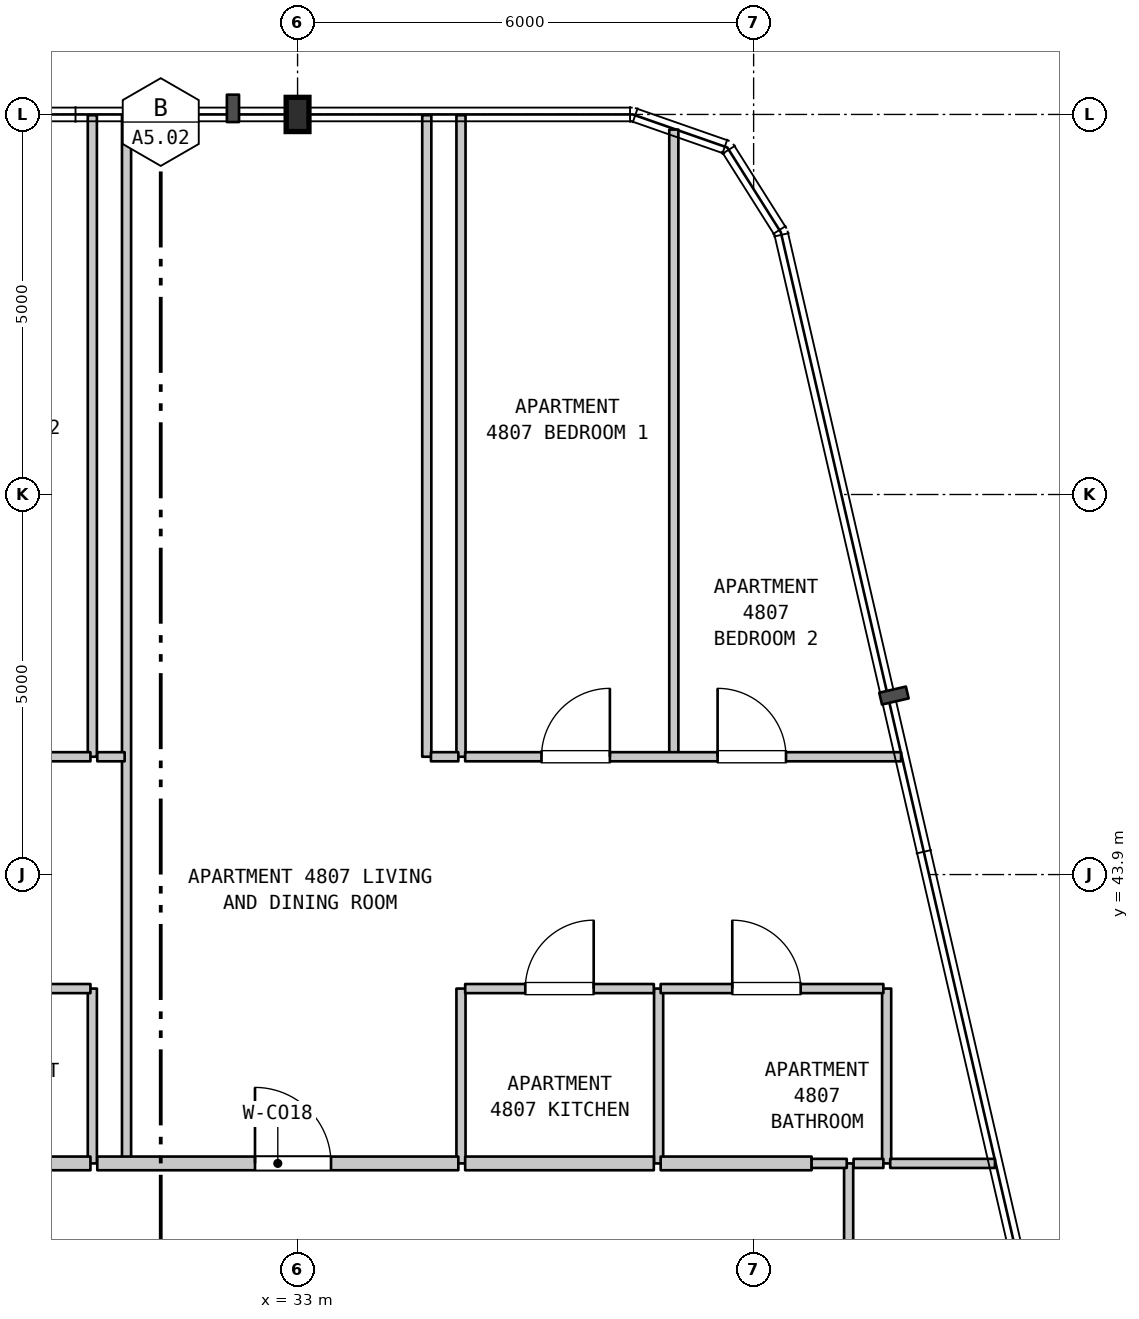
"""IFC4 building model, lengths in metres.
Left out: names, types, materials, properties, quantities, classifications, styles, units other than length and angle.
Written with IfcOpenShell. Run it as: python <this file> out.ifc"""

import sys

from ifc_helpers import new_model, si_unit, direction, frame, frame_2d, origin, origin_2d, place, context, subcontext, project, spatial, rectangle, i_section, extrude, element, fill, save


model = new_model("IFC4")
c1 = context("Model", 3, precision=1e-05, world=origin(), true_north=direction((0.0, 1.0)))
c2 = subcontext(c1, "Body", "Model", "MODEL_VIEW")
j1 = project(units=[si_unit("LENGTHUNIT", "METRE"), si_unit("PLANEANGLEUNIT", "RADIAN")], contexts=[c1])
p1 = place(None, origin())
s1 = spatial("IfcSite", under=j1, at=p1, CompositionType="ELEMENT")
p2 = place(p1, origin())
s2 = spatial("IfcBuilding", under=s1, at=p2, CompositionType="ELEMENT")
p3 = place(p2, frame((0.0, 0.0, 195.8)))
s3 = spatial("IfcBuildingStorey", under=s2, at=p3, CompositionType="ELEMENT", Elevation=195.8)
p4 = place(p3, frame((33.0, 53.9, 0.0), z_axis=(0.0, 0.0, 1.0), x_axis=(1.0, 0.0, 0.0)))
e1 = element("IfcColumn", 1, at=p4, inside=s3, PredefinedType="COLUMN", context=c2, shape_type="SweptSolid", body=[
    extrude(i_section(OverallWidth=0.3, OverallDepth=0.45, WebThickness=0.014, FlangeThickness=0.026, FilletRadius=0.027, at=origin_2d()), origin(), (0.0, 0.0, 1.0), 3.7),
])
p5 = place(p3, frame((30.3, 40.1, 0.0), z_axis=(0.0, 0.0, 1.0), x_axis=(0.0, 1.0, 0.0)))
e2 = element("IfcWall", 2, at=p5, inside=s3, PredefinedType="PARTITIONING", context=c2, shape_type="SweptSolid", body=[
    extrude(rectangle(XDim=2.3, YDim=0.12, at=frame_2d((1.15, 0.0))), origin(), (0.0, 0.0, 1.0), 3.39),
])
p6 = place(p3, frame((30.3, 45.45, 0.0), z_axis=(0.0, 0.0, 1.0), x_axis=(0.0, 1.0, 0.0)))
e3 = element("IfcWall", 3, at=p6, inside=s3, PredefinedType="PARTITIONING", context=c2, shape_type="SweptSolid", body=[
    extrude(rectangle(XDim=8.44, YDim=0.12, at=frame_2d((4.22, 0.0))), origin(), (0.0, 0.0, 1.0), 3.39),
])
p7 = place(p3, frame((30.75, 40.1, 0.0), z_axis=(0.0, 0.0, 1.0), x_axis=(0.0, 1.0, 0.0)))
e4 = element("IfcWall", 4, at=p7, inside=s3, PredefinedType="PARTITIONING", context=c2, shape_type="SweptSolid", body=[
    extrude(rectangle(XDim=13.79, YDim=0.12, at=frame_2d((6.895, 0.0))), origin(), (0.0, 0.0, 1.0), 3.39),
])
p8 = place(p3, frame((34.7, 45.45, 0.0), z_axis=(0.0, 0.0, 1.0), x_axis=(0.0, 1.0, 0.0)))
e5 = element("IfcWall", 5, at=p8, inside=s3, PredefinedType="PARTITIONING", context=c2, shape_type="SweptSolid", body=[
    extrude(rectangle(XDim=8.44, YDim=0.12, at=frame_2d((4.22, 0.0))), origin(), (0.0, 0.0, 1.0), 3.39),
])
p9 = place(p3, frame((35.15, 40.1, 0.0), z_axis=(0.0, 0.0, 1.0), x_axis=(0.0, 1.0, 0.0)))
e6 = element("IfcWall", 6, at=p9, inside=s3, PredefinedType="PARTITIONING", context=c2, shape_type="SweptSolid", body=[
    extrude(rectangle(XDim=2.3, YDim=0.12, at=frame_2d((1.15, 0.0))), origin(), (0.0, 0.0, 1.0), 3.39),
])
p10 = place(p3, frame((35.15, 45.45, 0.0), z_axis=(0.0, 0.0, 1.0), x_axis=(0.0, 1.0, 0.0)))
e7 = element("IfcWall", 7, at=p10, inside=s3, PredefinedType="PARTITIONING", context=c2, shape_type="SweptSolid", body=[
    extrude(rectangle(XDim=8.44, YDim=0.12, at=frame_2d((4.22, 0.0))), origin(), (0.0, 0.0, 1.0), 3.39),
])
p11 = place(p3, frame((37.75, 40.1, 0.0), z_axis=(0.0, 0.0, 1.0), x_axis=(0.0, 1.0, 0.0)))
e8 = element("IfcWall", 8, at=p11, inside=s3, PredefinedType="PARTITIONING", context=c2, shape_type="SweptSolid", body=[
    extrude(rectangle(XDim=2.3, YDim=0.12, at=frame_2d((1.15, 0.0))), origin(), (0.0, 0.0, 1.0), 3.39),
])
p12 = place(p3, frame((37.95, 45.45, 0.0), z_axis=(0.0, 0.0, 1.0), x_axis=(0.0, 1.0, 0.0)))
e9 = element("IfcWall", 9, at=p12, inside=s3, PredefinedType="PARTITIONING", context=c2, shape_type="SweptSolid", body=[
    extrude(rectangle(XDim=8.251, YDim=0.12, at=frame_2d((4.125, 0.0))), origin(), (0.0, 0.0, 1.0), 3.39),
])
p13 = place(p3, frame((40.25, 37.9, 0.0), z_axis=(0.0, 0.0, 1.0), x_axis=(0.0, 1.0, 0.0)))
e10 = element("IfcWall", 10, at=p13, inside=s3, PredefinedType="PARTITIONING", context=c2, shape_type="SweptSolid", body=[
    extrude(rectangle(XDim=2.2, YDim=0.12, at=frame_2d((1.1, 0.0))), origin(), (0.0, 0.0, 1.0), 3.39),
])
p14 = place(p3, frame((40.75, 40.1, 0.0), z_axis=(0.0, 0.0, 1.0), x_axis=(0.0, 1.0, 0.0)))
e11 = element("IfcWall", 11, at=p14, inside=s3, PredefinedType="PARTITIONING", context=c2, shape_type="SweptSolid", body=[
    extrude(rectangle(XDim=2.3, YDim=0.12, at=frame_2d((1.15, 0.0))), origin(), (0.0, 0.0, 1.0), 3.39),
])
p15 = place(p3, frame((27.125, 40.1, 0.0), z_axis=(0.0, 0.0, 1.0), x_axis=(1.0, 0.0, 0.0)))
e12 = element("IfcWall", 12, at=p15, inside=s3, PredefinedType="STANDARD", context=c2, shape_type="SweptSolid", body=[
    extrude(rectangle(XDim=3.15, YDim=0.18, at=frame_2d((1.575, 0.0))), origin(), (0.0, 0.0, 1.0), 3.39),
])
p16 = place(p3, frame((30.365, 40.1, 0.0), z_axis=(0.0, 0.0, 1.0), x_axis=(1.0, 0.0, 0.0)))
e13 = element("IfcWall", 13, at=p16, inside=s3, PredefinedType="STANDARD", context=c2, shape_type="SweptSolid", body=[
    extrude(rectangle(XDim=4.75, YDim=0.18, at=frame_2d((2.375, 0.0))), origin(), (0.0, 0.0, 1.0), 3.39),
])
p17 = place(p16, frame((2.075, 0.0, 0.0)))
e14 = element("IfcOpeningElement", 14, at=p17, cuts=e13, PredefinedType="OPENING", context=c2, shape_type="SweptSolid", body=[
    extrude(rectangle(XDim=1.0, YDim=2.15, at=frame_2d((0.5, 1.075))), frame((0.0, 0.1, 0.0), z_axis=(0.0, -1.0, 0.0), x_axis=(1.0, 0.0, 0.0)), (0.0, 0.0, 1.0), 0.2),
])
p18 = place(p3, frame((35.205, 40.1, 0.0), z_axis=(0.0, 0.0, 1.0), x_axis=(1.0, 0.0, 0.0)))
e15 = element("IfcWall", 15, at=p18, inside=s3, PredefinedType="STANDARD", context=c2, shape_type="SweptSolid", body=[
    extrude(rectangle(XDim=2.482, YDim=0.18, at=frame_2d((1.241, 0.0))), origin(), (0.0, 0.0, 1.0), 3.39),
])
p19 = place(p3, frame((37.777, 40.1, 0.0), z_axis=(0.0, 0.0, 1.0), x_axis=(1.0, 0.0, 0.0)))
e16 = element("IfcWall", 16, at=p19, inside=s3, PredefinedType="STANDARD", context=c2, shape_type="SweptSolid", body=[
    extrude(rectangle(XDim=1.986, YDim=0.18, at=frame_2d((0.993, 0.0))), origin(), (0.0, 0.0, 1.0), 3.39),
])
p20 = place(p3, frame((39.763, 40.1, 0.0), z_axis=(0.0, 0.0, 1.0), x_axis=(1.0, 0.0, 0.0)))
e17 = element("IfcWall", 17, at=p20, inside=s3, PredefinedType="PARTITIONING", context=c2, shape_type="SweptSolid", body=[
    extrude(rectangle(XDim=0.462, YDim=0.12, at=frame_2d((0.231, 0.0))), origin(), (0.0, 0.0, 1.0), 3.39),
])
p21 = place(p3, frame((40.315, 40.1, 0.0), z_axis=(0.0, 0.0, 1.0), x_axis=(1.0, 0.0, 0.0)))
e18 = element("IfcWall", 18, at=p21, inside=s3, PredefinedType="PARTITIONING", context=c2, shape_type="SweptSolid", body=[
    extrude(rectangle(XDim=0.392, YDim=0.12, at=frame_2d((0.196, 0.0))), origin(), (0.0, 0.0, 1.0), 3.39),
])
p22 = place(p3, frame((40.797, 40.1, 0.0), z_axis=(0.0, 0.0, 1.0), x_axis=(1.0, 0.0, 0.0)))
e19 = element("IfcWall", 19, at=p22, inside=s3, PredefinedType="PARTITIONING", context=c2, shape_type="SweptSolid", body=[
    extrude(rectangle(XDim=1.378, YDim=0.12, at=frame_2d((0.689, 0.0))), origin(), (0.0, 0.0, 1.0), 3.39),
])
p23 = place(p3, frame((27.125, 42.4, 0.0), z_axis=(0.0, 0.0, 1.0), x_axis=(1.0, 0.0, 0.0)))
e20 = element("IfcWall", 20, at=p23, inside=s3, PredefinedType="PARTITIONING", context=c2, shape_type="SweptSolid", body=[
    extrude(rectangle(XDim=3.15, YDim=0.12, at=frame_2d((1.575, 0.0))), origin(), (0.0, 0.0, 1.0), 3.39),
])
p24 = place(p23, frame((1.054, 0.0, 0.0)))
e21 = element("IfcOpeningElement", 21, at=p24, cuts=e20, PredefinedType="OPENING", context=c2, shape_type="SweptSolid", body=[
    extrude(rectangle(XDim=0.9, YDim=2.1, at=frame_2d((0.45, 1.05))), frame((0.0, 0.07, 0.0), z_axis=(0.0, -1.0, 0.0), x_axis=(1.0, 0.0, 0.0)), (0.0, 0.0, 1.0), 0.14),
])
p25 = place(p3, frame((35.205, 42.4, 0.0), z_axis=(0.0, 0.0, 1.0), x_axis=(1.0, 0.0, 0.0)))
e22 = element("IfcWall", 22, at=p25, inside=s3, PredefinedType="PARTITIONING", context=c2, shape_type="SweptSolid", body=[
    extrude(rectangle(XDim=2.482, YDim=0.12, at=frame_2d((1.241, 0.0))), origin(), (0.0, 0.0, 1.0), 3.39),
])
p26 = place(p25, frame((0.791, 0.0, 0.0)))
e23 = element("IfcOpeningElement", 23, at=p26, cuts=e22, PredefinedType="OPENING", context=c2, shape_type="SweptSolid", body=[
    extrude(rectangle(XDim=0.9, YDim=2.15, at=frame_2d((0.45, 1.075))), frame((0.0, 0.07, 0.0), z_axis=(0.0, -1.0, 0.0), x_axis=(1.0, 0.0, 0.0)), (0.0, 0.0, 1.0), 0.14),
])
p27 = place(p3, frame((37.777, 42.4, 0.0), z_axis=(0.0, 0.0, 1.0), x_axis=(1.0, 0.0, 0.0)))
e24 = element("IfcWall", 24, at=p27, inside=s3, PredefinedType="PARTITIONING", context=c2, shape_type="SweptSolid", body=[
    extrude(rectangle(XDim=2.93, YDim=0.12, at=frame_2d((1.465, 0.0))), origin(), (0.0, 0.0, 1.0), 3.39),
])
p28 = place(p27, frame((0.942, 0.0, 0.0)))
e25 = element("IfcOpeningElement", 25, at=p28, cuts=e24, PredefinedType="OPENING", context=c2, shape_type="SweptSolid", body=[
    extrude(rectangle(XDim=0.9, YDim=2.1, at=frame_2d((0.45, 1.05))), frame((0.0, 0.07, 0.0), z_axis=(0.0, -1.0, 0.0), x_axis=(1.0, 0.0, 0.0)), (0.0, 0.0, 1.0), 0.14),
])
p29 = place(p3, frame((24.365, 45.45, 0.0), z_axis=(0.0, 0.0, 1.0), x_axis=(1.0, 0.0, 0.0)))
e26 = element("IfcWall", 26, at=p29, inside=s3, PredefinedType="PARTITIONING", context=c2, shape_type="SweptSolid", body=[
    extrude(rectangle(XDim=5.91, YDim=0.12, at=frame_2d((2.955, 0.0))), origin(), (0.0, 0.0, 1.0), 3.39),
])
p30 = place(p29, frame((1.11, 0.0, 0.0)))
e27 = element("IfcOpeningElement", 27, at=p30, cuts=e26, PredefinedType="OPENING", context=c2, shape_type="SweptSolid", body=[
    extrude(rectangle(XDim=0.9, YDim=2.15, at=frame_2d((0.45, 1.075))), frame((0.0, 0.07, 0.0), z_axis=(0.0, -1.0, 0.0), x_axis=(1.0, 0.0, 0.0)), (0.0, 0.0, 1.0), 0.14),
])
p31 = place(p29, frame((3.76, 0.0, 0.0)))
e28 = element("IfcOpeningElement", 28, at=p31, cuts=e26, PredefinedType="OPENING", context=c2, shape_type="SweptSolid", body=[
    extrude(rectangle(XDim=0.9, YDim=2.15, at=frame_2d((0.45, 1.075))), frame((0.0, 0.07, 0.0), z_axis=(0.0, -1.0, 0.0), x_axis=(1.0, 0.0, 0.0)), (0.0, 0.0, 1.0), 0.14),
])
for number, where, z_axis, x_axis in (
    (29, (30.365, 45.45, 0.0), (0.0, 0.0, 1.0), (1.0, 0.0, 0.0)),
    (30, (34.755, 45.45, 0.0), (0.0, 0.0, 1.0), (1.0, 0.0, 0.0)),
):
    element("IfcWall", number, at=place(p3, frame(where, z_axis=z_axis, x_axis=x_axis)), inside=s3, PredefinedType="PARTITIONING", context=c2, shape_type="SweptSolid", body=[
        extrude(rectangle(XDim=0.36, YDim=0.12, at=frame_2d((0.18, 0.0))), origin(), (0.0, 0.0, 1.0), 3.39),
    ])
p32 = place(p3, frame((35.205, 45.45, 0.0), z_axis=(0.0, 0.0, 1.0), x_axis=(1.0, 0.0, 0.0)))
e31 = element("IfcWall", 31, at=p32, inside=s3, PredefinedType="PARTITIONING", context=c2, shape_type="SweptSolid", body=[
    extrude(rectangle(XDim=5.735, YDim=0.12, at=frame_2d((2.867, 0.0))), origin(), (0.0, 0.0, 1.0), 3.39),
])
p33 = place(p32, frame((1.004, 0.0, 0.0)))
e32 = element("IfcOpeningElement", 32, at=p33, cuts=e31, PredefinedType="OPENING", context=c2, shape_type="SweptSolid", body=[
    extrude(rectangle(XDim=0.9, YDim=2.15, at=frame_2d((0.45, 1.075))), frame((0.0, 0.07, 0.0), z_axis=(0.0, -1.0, 0.0), x_axis=(1.0, 0.0, 0.0)), (0.0, 0.0, 1.0), 0.14),
])
p34 = place(p32, frame((3.321, 0.0, 0.0)))
e33 = element("IfcOpeningElement", 33, at=p34, cuts=e31, PredefinedType="OPENING", context=c2, shape_type="SweptSolid", body=[
    extrude(rectangle(XDim=0.9, YDim=2.15, at=frame_2d((0.45, 1.075))), frame((0.0, 0.07, 0.0), z_axis=(0.0, -1.0, 0.0), x_axis=(1.0, 0.0, 0.0)), (0.0, 0.0, 1.0), 0.14),
])
p35 = place(p17, origin())
e34 = element("IfcDoor", 34, at=p35, inside=s3, OperationType="SINGLE_SWING_LEFT", PredefinedType="DOOR", context=c2, shape_type="SweptSolid", body=[
    extrude(rectangle(XDim=1.0, YDim=2.15, at=frame_2d((0.5, 1.075))), frame((0.0, 0.025, 0.0), z_axis=(0.0, -1.0, 0.0), x_axis=(1.0, 0.0, 0.0)), (0.0, 0.0, 1.0), 0.05),
])
fill(e14, e34)
p36 = place(p26, origin())
e35 = element("IfcDoor", 35, at=p36, inside=s3, OperationType="SINGLE_SWING_RIGHT", PredefinedType="DOOR", context=c2, shape_type="SweptSolid", body=[
    extrude(rectangle(XDim=0.9, YDim=2.15, at=frame_2d((0.45, 1.075))), frame((0.0, 0.025, 0.0), z_axis=(0.0, -1.0, 0.0), x_axis=(1.0, 0.0, 0.0)), (0.0, 0.0, 1.0), 0.05),
])
fill(e23, e35)
p37 = place(p28, origin())
e36 = element("IfcDoor", 36, at=p37, inside=s3, OperationType="SINGLE_SWING_LEFT", PredefinedType="DOOR", context=c2, shape_type="SweptSolid", body=[
    extrude(rectangle(XDim=0.9, YDim=2.1, at=frame_2d((0.45, 1.05))), frame((0.0, 0.025, 0.0), z_axis=(0.0, -1.0, 0.0), x_axis=(1.0, 0.0, 0.0)), (0.0, 0.0, 1.0), 0.05),
])
fill(e25, e36)
p38 = place(p33, origin())
e37 = element("IfcDoor", 37, at=p38, inside=s3, OperationType="SINGLE_SWING_RIGHT", PredefinedType="DOOR", context=c2, shape_type="SweptSolid", body=[
    extrude(rectangle(XDim=0.9, YDim=2.15, at=frame_2d((0.45, 1.075))), frame((0.0, 0.025, 0.0), z_axis=(0.0, -1.0, 0.0), x_axis=(1.0, 0.0, 0.0)), (0.0, 0.0, 1.0), 0.05),
])
fill(e32, e37)
p39 = place(p34, origin())
e38 = element("IfcDoor", 38, at=p39, inside=s3, OperationType="SINGLE_SWING_LEFT", PredefinedType="DOOR", context=c2, shape_type="SweptSolid", body=[
    extrude(rectangle(XDim=0.9, YDim=2.15, at=frame_2d((0.45, 1.075))), frame((0.0, 0.025, 0.0), z_axis=(0.0, -1.0, 0.0), x_axis=(1.0, 0.0, 0.0)), (0.0, 0.0, 1.0), 0.05),
])
fill(e33, e38)
save(model, sys.argv[1])
